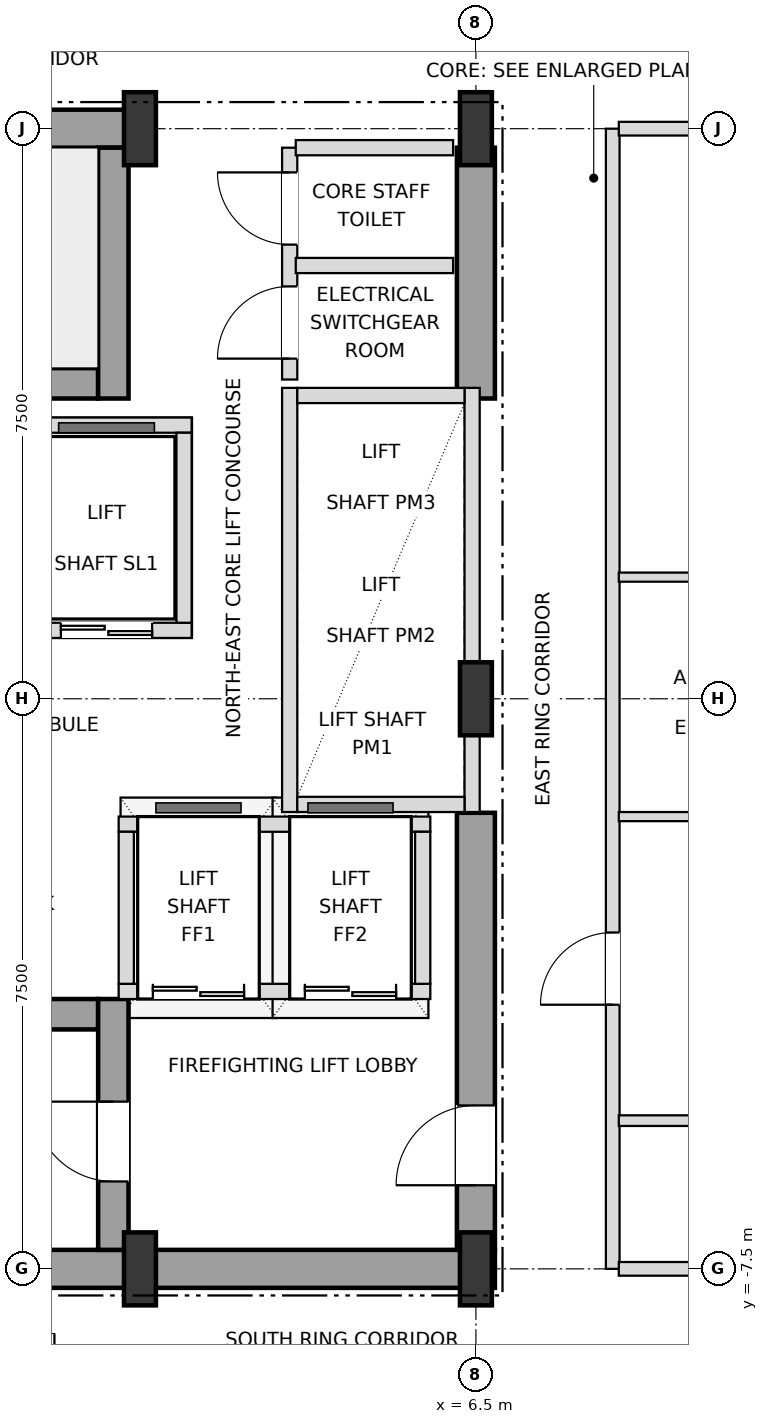
"""IFC4 building model, lengths in metres.
Left out: names, types, materials, properties, quantities, classifications, styles, units other than length and angle.
Written with IfcOpenShell. Run it as: python <this file> out.ifc"""

import sys

from ifc_helpers import new_model, si_unit, direction, frame, frame_2d, origin, origin_2d, place, context, subcontext, project, spatial, rectangle, i_section, extrude, element, fill, save


model = new_model("IFC4")
c1 = context("Model", 3, precision=1e-05, world=origin(), true_north=direction((0.0, 1.0)))
c2 = subcontext(c1, "Body", "Model", "MODEL_VIEW")
j1 = project(units=[si_unit("LENGTHUNIT", "METRE"), si_unit("PLANEANGLEUNIT", "RADIAN")], contexts=[c1])
p1 = place(None, origin())
s1 = spatial("IfcSite", under=j1, at=p1, CompositionType="ELEMENT")
p2 = place(p1, origin())
s2 = spatial("IfcBuilding", under=s1, at=p2, CompositionType="ELEMENT")
p3 = place(p2, frame((0.0, 0.0, 43.2)))
s3 = spatial("IfcBuildingStorey", under=s2, at=p3, CompositionType="ELEMENT", Elevation=43.2)
for number, where, z_axis, x_axis in (
    (1, (2.08, -7.5, 0.0), (0.0, 0.0, 1.0), (1.0, 0.0, 0.0)),
    (2, (6.5, -7.5, 0.0), (0.0, 0.0, 1.0), (1.0, 0.0, 0.0)),
    (3, (6.5, 0.0, 0.0), (0.0, 0.0, 1.0), (1.0, 0.0, 0.0)),
    (4, (2.08, 7.5, 0.0), (0.0, 0.0, 1.0), (1.0, 0.0, 0.0)),
    (5, (6.5, 7.5, 0.0), (0.0, 0.0, 1.0), (1.0, 0.0, 0.0)),
):
    element("IfcColumn", number, at=place(p3, frame(where, z_axis=z_axis, x_axis=x_axis)), inside=s3, PredefinedType="COLUMN", context=c2, shape_type="SweptSolid", body=[
        extrude(i_section(OverallWidth=0.42, OverallDepth=0.96, WebThickness=0.022, FlangeThickness=0.034, at=origin_2d()), origin(), (0.0, 0.0, 1.0), 3.6),
    ])
p4 = place(p3, frame((0.0, -7.5, 0.0), z_axis=(0.0, 0.0, 1.0), x_axis=(1.0, 0.0, 0.0)))
e6 = element("IfcWall", 6, at=p4, inside=s3, PredefinedType="SHEAR", context=c2, shape_type="SweptSolid", body=[
    extrude(rectangle(XDim=6.75, YDim=0.5, at=frame_2d((3.375, 0.0))), origin(), (0.0, 0.0, 1.0), 3.38),
])
p5 = place(p3, frame((0.0, 7.5, 0.0), z_axis=(0.0, 0.0, 1.0), x_axis=(1.0, 0.0, 0.0)))
e7 = element("IfcWall", 7, at=p5, inside=s3, PredefinedType="SHEAR", context=c2, shape_type="SweptSolid", body=[
    extrude(rectangle(XDim=2.08, YDim=0.5, at=frame_2d((1.04, 0.0))), origin(), (0.0, 0.0, 1.0), 3.38),
])
p6 = place(p3, frame((6.5, -7.25, 0.0), z_axis=(0.0, 0.0, 1.0), x_axis=(0.0, 1.0, 0.0)))
e8 = element("IfcWall", 8, at=p6, inside=s3, PredefinedType="SHEAR", context=c2, shape_type="SweptSolid", body=[
    extrude(rectangle(XDim=5.75, YDim=0.5, at=frame_2d((2.875, 0.0))), origin(), (0.0, 0.0, 1.0), 3.38),
])
p7 = place(p6, frame((0.85, 0.0, 0.0)))
e9 = element("IfcOpeningElement", 9, at=p7, cuts=e8, PredefinedType="OPENING", context=c2, shape_type="SweptSolid", body=[
    extrude(rectangle(XDim=1.05, YDim=2.15, at=frame_2d((0.525, 1.075))), frame((0.0, 0.26, 0.0), z_axis=(0.0, -1.0, 0.0), x_axis=(1.0, 0.0, 0.0)), (0.0, 0.0, 1.0), 0.52),
])
p8 = place(p3, frame((6.5, 3.95, 0.0), z_axis=(0.0, 0.0, 1.0), x_axis=(0.0, 1.0, 0.0)))
e10 = element("IfcWall", 10, at=p8, inside=s3, PredefinedType="SHEAR", context=c2, shape_type="SweptSolid", body=[
    extrude(rectangle(XDim=3.3, YDim=0.5, at=frame_2d((1.65, 0.0))), origin(), (0.0, 0.0, 1.0), 3.38),
])
p9 = place(p3, frame((-6.25, -4.15, 0.0), z_axis=(0.0, 0.0, 1.0), x_axis=(1.0, 0.0, 0.0)))
e11 = element("IfcWall", 11, at=p9, inside=s3, PredefinedType="SHEAR", context=c2, shape_type="SweptSolid", body=[
    extrude(rectangle(XDim=7.78, YDim=0.4, at=frame_2d((3.89, 0.0))), origin(), (0.0, 0.0, 1.0), 3.38),
])
p10 = place(p3, frame((1.73, -7.25, 0.0), z_axis=(0.0, 0.0, 1.0), x_axis=(0.0, 1.0, 0.0)))
e12 = element("IfcWall", 12, at=p10, inside=s3, PredefinedType="SHEAR", context=c2, shape_type="SweptSolid", body=[
    extrude(rectangle(XDim=3.3, YDim=0.4, at=frame_2d((1.65, 0.0))), origin(), (0.0, 0.0, 1.0), 3.38),
])
p11 = place(p10, frame((0.9, 0.0, 0.0)))
e13 = element("IfcOpeningElement", 13, at=p11, cuts=e12, PredefinedType="OPENING", context=c2, shape_type="SweptSolid", body=[
    extrude(rectangle(XDim=1.05, YDim=2.15, at=frame_2d((0.525, 1.075))), frame((0.0, 0.21, 0.0), z_axis=(0.0, -1.0, 0.0), x_axis=(1.0, 0.0, 0.0)), (0.0, 0.0, 1.0), 0.42),
])
p12 = place(p3, frame((-5.55, 4.15, 0.0), z_axis=(0.0, 0.0, 1.0), x_axis=(1.0, 0.0, 0.0)))
e14 = element("IfcWall", 14, at=p12, inside=s3, PredefinedType="SHEAR", context=c2, shape_type="SweptSolid", body=[
    extrude(rectangle(XDim=7.08, YDim=0.4, at=frame_2d((3.54, 0.0))), origin(), (0.0, 0.0, 1.0), 3.38),
])
p13 = place(p3, frame((1.73, 3.95, 0.0), z_axis=(0.0, 0.0, 1.0), x_axis=(0.0, 1.0, 0.0)))
e15 = element("IfcWall", 15, at=p13, inside=s3, PredefinedType="SHEAR", context=c2, shape_type="SweptSolid", body=[
    extrude(rectangle(XDim=3.3, YDim=0.4, at=frame_2d((1.65, 0.0))), origin(), (0.0, 0.0, 1.0), 3.38),
])
p14 = place(p3, frame((4.05, -1.49, 0.0), z_axis=(0.0, 0.0, 1.0), x_axis=(0.0, 1.0, 0.0)))
e16 = element("IfcWall", 16, at=p14, inside=s3, PredefinedType="SOLIDWALL", context=c2, shape_type="SweptSolid", body=[
    extrude(rectangle(XDim=5.58, YDim=0.2, at=frame_2d((2.79, 0.0))), origin(), (0.0, 0.0, 1.0), 3.38),
])
p15 = place(p3, frame((6.45, -1.49, 0.0), z_axis=(0.0, 0.0, 1.0), x_axis=(0.0, 1.0, 0.0)))
e17 = element("IfcWall", 17, at=p15, inside=s3, PredefinedType="SOLIDWALL", context=c2, shape_type="SweptSolid", body=[
    extrude(rectangle(XDim=5.58, YDim=0.2, at=frame_2d((2.79, 0.0))), origin(), (0.0, 0.0, 1.0), 2.816),
])
for number, where, z_axis, x_axis in (
    (18, (4.15, -1.39, 0.0), (0.0, 0.0, 1.0), (1.0, 0.0, 0.0)),
    (19, (4.15, 3.99, 0.0), (0.0, 0.0, 1.0), (1.0, 0.0, 0.0)),
):
    element("IfcWall", number, at=place(p3, frame(where, z_axis=z_axis, x_axis=x_axis)), inside=s3, PredefinedType="SOLIDWALL", context=c2, shape_type="SweptSolid", body=[
        extrude(rectangle(XDim=2.2, YDim=0.2, at=frame_2d((1.1, 0.0))), origin(), (0.0, 0.0, 1.0), 3.38),
    ])
p16 = place(p3, frame((-2.82, 0.9, 0.0), z_axis=(0.0, 0.0, 1.0), x_axis=(1.0, 0.0, 0.0)))
e20 = element("IfcWall", 20, at=p16, inside=s3, PredefinedType="SOLIDWALL", context=c2, shape_type="SweptSolid", body=[
    extrude(rectangle(XDim=5.58, YDim=0.2, at=frame_2d((2.79, 0.0))), origin(), (0.0, 0.0, 1.0), 3.38),
])
p17 = place(p16, frame((3.86, 0.0, 0.0)))
e21 = element("IfcOpeningElement", 21, at=p17, cuts=e20, PredefinedType="OPENING", context=c2, shape_type="SweptSolid", body=[
    extrude(rectangle(XDim=1.2, YDim=2.2, at=frame_2d((0.6, 1.1))), frame((0.0, 0.11, 0.0), z_axis=(0.0, -1.0, 0.0), x_axis=(1.0, 0.0, 0.0)), (0.0, 0.0, 1.0), 0.22),
])
p18 = place(p3, frame((-2.82, 3.6, 0.0), z_axis=(0.0, 0.0, 1.0), x_axis=(1.0, 0.0, 0.0)))
e22 = element("IfcWall", 22, at=p18, inside=s3, PredefinedType="SOLIDWALL", context=c2, shape_type="SweptSolid", body=[
    extrude(rectangle(XDim=5.58, YDim=0.2, at=frame_2d((2.79, 0.0))), origin(), (0.0, 0.0, 1.0), 3.38),
])
p19 = place(p3, frame((2.66, 1.0, 0.0), z_axis=(0.0, 0.0, 1.0), x_axis=(0.0, 1.0, 0.0)))
e23 = element("IfcWall", 23, at=p19, inside=s3, PredefinedType="SOLIDWALL", context=c2, shape_type="SweptSolid", body=[
    extrude(rectangle(XDim=2.5, YDim=0.2, at=frame_2d((1.25, 0.0))), origin(), (0.0, 0.0, 1.0), 3.38),
])
p20 = place(p3, frame((1.8, -3.85, 0.0), z_axis=(0.0, 0.0, 1.0), x_axis=(1.0, 0.0, 0.0)))
e24 = element("IfcWall", 24, at=p20, inside=s3, PredefinedType="SOLIDWALL", context=c2, shape_type="SweptSolid", body=[
    extrude(rectangle(XDim=4.1, YDim=0.2, at=frame_2d((2.05, 0.0))), origin(), (0.0, 0.0, 1.0), 3.38),
])
p21 = place(p20, frame((0.45, 0.0, 0.0)))
e25 = element("IfcOpeningElement", 25, at=p21, cuts=e24, PredefinedType="OPENING", context=c2, shape_type="SweptSolid", body=[
    extrude(rectangle(XDim=1.2, YDim=2.2, at=frame_2d((0.6, 1.1))), frame((0.0, 0.11, 0.0), z_axis=(0.0, -1.0, 0.0), x_axis=(1.0, 0.0, 0.0)), (0.0, 0.0, 1.0), 0.22),
])
p22 = place(p20, frame((2.45, 0.0, 0.0)))
e26 = element("IfcOpeningElement", 26, at=p22, cuts=e24, PredefinedType="OPENING", context=c2, shape_type="SweptSolid", body=[
    extrude(rectangle(XDim=1.2, YDim=2.2, at=frame_2d((0.6, 1.1))), frame((0.0, 0.11, 0.0), z_axis=(0.0, -1.0, 0.0), x_axis=(1.0, 0.0, 0.0)), (0.0, 0.0, 1.0), 0.22),
])
p23 = place(p3, frame((1.8, -1.65, 0.0), z_axis=(0.0, 0.0, 1.0), x_axis=(1.0, 0.0, 0.0)))
e27 = element("IfcWall", 27, at=p23, inside=s3, PredefinedType="SOLIDWALL", context=c2, shape_type="SweptSolid", body=[
    extrude(rectangle(XDim=4.1, YDim=0.2, at=frame_2d((2.05, 0.0))), origin(), (0.0, 0.0, 1.0), 3.38),
])
for number, where, z_axis, x_axis in (
    (28, (1.9, -3.75, 0.0), (0.0, 0.0, 1.0), (0.0, 1.0, 0.0)),
    (29, (5.8, -3.75, 0.0), (0.0, 0.0, 1.0), (0.0, 1.0, 0.0)),
):
    element("IfcWall", number, at=place(p3, frame(where, z_axis=z_axis, x_axis=x_axis)), inside=s3, PredefinedType="SOLIDWALL", context=c2, shape_type="SweptSolid", body=[
        extrude(rectangle(XDim=2.0, YDim=0.2, at=frame_2d((1.0, 0.0))), origin(), (0.0, 0.0, 1.0), 3.38),
    ])
p24 = place(p3, frame((4.05, 4.2, 0.0), z_axis=(0.0, 0.0, 1.0), x_axis=(0.0, 1.0, 0.0)))
e30 = element("IfcWall", 30, at=p24, inside=s3, PredefinedType="SOLIDWALL", context=c2, shape_type="SweptSolid", body=[
    extrude(rectangle(XDim=3.05, YDim=0.2, at=frame_2d((1.525, 0.0))), origin(), (0.0, 0.0, 1.0), 3.38),
])
p25 = place(p24, frame((0.275, 0.0, 0.0)))
e31 = element("IfcOpeningElement", 31, at=p25, cuts=e30, PredefinedType="OPENING", context=c2, shape_type="SweptSolid", body=[
    extrude(rectangle(XDim=0.95, YDim=2.15, at=frame_2d((0.475, 1.075))), frame((0.0, 0.11, 0.0), z_axis=(0.0, -1.0, 0.0), x_axis=(1.0, 0.0, 0.0)), (0.0, 0.0, 1.0), 0.22),
])
p26 = place(p24, frame((1.775, 0.0, 0.0)))
e32 = element("IfcOpeningElement", 32, at=p26, cuts=e30, PredefinedType="OPENING", context=c2, shape_type="SweptSolid", body=[
    extrude(rectangle(XDim=0.95, YDim=2.15, at=frame_2d((0.475, 1.075))), frame((0.0, 0.11, 0.0), z_axis=(0.0, -1.0, 0.0), x_axis=(1.0, 0.0, 0.0)), (0.0, 0.0, 1.0), 0.22),
])
p27 = place(p3, frame((8.3, -7.5, 0.0), z_axis=(0.0, 0.0, 1.0), x_axis=(0.0, 1.0, 0.0)))
e33 = element("IfcWall", 33, at=p27, inside=s3, PredefinedType="PARTITIONING", context=c2, shape_type="SweptSolid", body=[
    extrude(rectangle(XDim=15.0, YDim=0.18, at=frame_2d((7.5, 0.0))), origin(), (0.0, 0.0, 1.0), 3.38),
])
p28 = place(p27, frame((3.475, 0.0, 0.0)))
e34 = element("IfcOpeningElement", 34, at=p28, cuts=e33, PredefinedType="OPENING", context=c2, shape_type="SweptSolid", body=[
    extrude(rectangle(XDim=0.95, YDim=2.15, at=frame_2d((0.475, 1.075))), frame((0.0, 0.1, 0.0), z_axis=(0.0, -1.0, 0.0), x_axis=(1.0, 0.0, 0.0)), (0.0, 0.0, 1.0), 0.2),
])
p29 = place(p3, frame((8.38, -7.5, 0.0), z_axis=(0.0, 0.0, 1.0), x_axis=(1.0, 0.0, 0.0)))
e35 = element("IfcWall", 35, at=p29, inside=s3, PredefinedType="PARTITIONING", context=c2, shape_type="SweptSolid", body=[
    extrude(rectangle(XDim=7.64, YDim=0.18, at=frame_2d((3.82, 0.0))), origin(), (0.0, 0.0, 1.0), 2.816),
])
p30 = place(p3, frame((8.38, -5.55, 0.0), z_axis=(0.0, 0.0, 1.0), x_axis=(1.0, 0.0, 0.0)))
e36 = element("IfcWall", 36, at=p30, inside=s3, PredefinedType="PARTITIONING", context=c2, shape_type="SweptSolid", body=[
    extrude(rectangle(XDim=7.64, YDim=0.14, at=frame_2d((3.82, 0.0))), origin(), (0.0, 0.0, 1.0), 2.948),
])
p31 = place(p30, frame((3.37, 0.0, 0.0)))
e37 = element("IfcOpeningElement", 37, at=p31, cuts=e36, PredefinedType="OPENING", context=c2, shape_type="SweptSolid", body=[
    extrude(rectangle(XDim=0.9, YDim=2.1, at=frame_2d((0.45, 1.05))), frame((0.0, 0.08, 0.0), z_axis=(0.0, -1.0, 0.0), x_axis=(1.0, 0.0, 0.0)), (0.0, 0.0, 1.0), 0.16),
])
p32 = place(p3, frame((8.38, -1.55, 0.0), z_axis=(0.0, 0.0, 1.0), x_axis=(1.0, 0.0, 0.0)))
e38 = element("IfcWall", 38, at=p32, inside=s3, PredefinedType="PARTITIONING", context=c2, shape_type="SweptSolid", body=[
    extrude(rectangle(XDim=7.64, YDim=0.12, at=frame_2d((3.82, 0.0))), origin(), (0.0, 0.0, 1.0), 2.948),
])
p33 = place(p32, frame((3.345, 0.0, 0.0)))
e39 = element("IfcOpeningElement", 39, at=p33, cuts=e38, PredefinedType="OPENING", context=c2, shape_type="SweptSolid", body=[
    extrude(rectangle(XDim=0.95, YDim=2.1, at=frame_2d((0.475, 1.05))), frame((0.0, 0.07, 0.0), z_axis=(0.0, -1.0, 0.0), x_axis=(1.0, 0.0, 0.0)), (0.0, 0.0, 1.0), 0.14),
])
p34 = place(p3, frame((8.38, 1.6, 0.0), z_axis=(0.0, 0.0, 1.0), x_axis=(1.0, 0.0, 0.0)))
e40 = element("IfcWall", 40, at=p34, inside=s3, PredefinedType="PARTITIONING", context=c2, shape_type="SweptSolid", body=[
    extrude(rectangle(XDim=7.64, YDim=0.12, at=frame_2d((3.82, 0.0))), origin(), (0.0, 0.0, 1.0), 2.948),
])
p35 = place(p34, frame((3.37, 0.0, 0.0)))
e41 = element("IfcOpeningElement", 41, at=p35, cuts=e40, PredefinedType="OPENING", context=c2, shape_type="SweptSolid", body=[
    extrude(rectangle(XDim=0.9, YDim=2.1, at=frame_2d((0.45, 1.05))), frame((0.0, 0.07, 0.0), z_axis=(0.0, -1.0, 0.0), x_axis=(1.0, 0.0, 0.0)), (0.0, 0.0, 1.0), 0.14),
])
for number, where, z_axis, x_axis in (
    (42, (4.13, 5.7, 0.0), (0.0, 0.0, 1.0), (1.0, 0.0, 0.0)),
    (43, (4.13, 7.25, 0.0), (0.0, 0.0, 1.0), (1.0, 0.0, 0.0)),
):
    element("IfcWall", number, at=place(p3, frame(where, z_axis=z_axis, x_axis=x_axis)), inside=s3, PredefinedType="SOLIDWALL", context=c2, shape_type="SweptSolid", body=[
        extrude(rectangle(XDim=2.07, YDim=0.2, at=frame_2d((1.035, 0.0))), origin(), (0.0, 0.0, 1.0), 3.38),
    ])
p36 = place(p3, frame((8.38, 7.5, 0.0), z_axis=(0.0, 0.0, 1.0), x_axis=(1.0, 0.0, 0.0)))
e44 = element("IfcWall", 44, at=p36, inside=s3, PredefinedType="PARTITIONING", context=c2, shape_type="SweptSolid", body=[
    extrude(rectangle(XDim=7.64, YDim=0.18, at=frame_2d((3.82, 0.0))), origin(), (0.0, 0.0, 1.0), 2.816),
])
p37 = place(p7, origin())
e45 = element("IfcDoor", 45, at=p37, inside=s3, OperationType="SINGLE_SWING_LEFT", PredefinedType="DOOR", context=c2, shape_type="SweptSolid", body=[
    extrude(rectangle(XDim=1.05, YDim=2.15, at=frame_2d((0.525, 1.075))), frame((0.0, 0.025, 0.0), z_axis=(0.0, -1.0, 0.0), x_axis=(1.0, 0.0, 0.0)), (0.0, 0.0, 1.0), 0.05),
])
fill(e9, e45)
p38 = place(p11, origin())
e46 = element("IfcDoor", 46, at=p38, inside=s3, OperationType="SINGLE_SWING_RIGHT", PredefinedType="DOOR", context=c2, shape_type="SweptSolid", body=[
    extrude(rectangle(XDim=1.05, YDim=2.15, at=frame_2d((0.525, 1.075))), frame((0.0, 0.025, 0.0), z_axis=(0.0, -1.0, 0.0), x_axis=(1.0, 0.0, 0.0)), (0.0, 0.0, 1.0), 0.05),
])
fill(e13, e46)
p39 = place(p17, origin())
e47 = element("IfcDoor", 47, at=p39, inside=s3, OperationType="DOUBLE_DOOR_SLIDING", PredefinedType="DOOR", context=c2, shape_type="SweptSolid", body=[
    extrude(rectangle(XDim=1.2, YDim=2.2, at=frame_2d((0.6, 1.1))), frame((0.0, 0.025, 0.0), z_axis=(0.0, -1.0, 0.0), x_axis=(1.0, 0.0, 0.0)), (0.0, 0.0, 1.0), 0.05),
])
fill(e21, e47)
p40 = place(p21, origin())
e48 = element("IfcDoor", 48, at=p40, inside=s3, OperationType="DOUBLE_DOOR_SLIDING", PredefinedType="DOOR", context=c2, shape_type="SweptSolid", body=[
    extrude(rectangle(XDim=1.2, YDim=2.2, at=frame_2d((0.6, 1.1))), frame((0.0, 0.025, 0.0), z_axis=(0.0, -1.0, 0.0), x_axis=(1.0, 0.0, 0.0)), (0.0, 0.0, 1.0), 0.05),
])
fill(e25, e48)
p41 = place(p22, origin())
e49 = element("IfcDoor", 49, at=p41, inside=s3, OperationType="DOUBLE_DOOR_SLIDING", PredefinedType="DOOR", context=c2, shape_type="SweptSolid", body=[
    extrude(rectangle(XDim=1.2, YDim=2.2, at=frame_2d((0.6, 1.1))), frame((0.0, 0.025, 0.0), z_axis=(0.0, -1.0, 0.0), x_axis=(1.0, 0.0, 0.0)), (0.0, 0.0, 1.0), 0.05),
])
fill(e26, e49)
p42 = place(p25, origin())
e50 = element("IfcDoor", 50, at=p42, inside=s3, OperationType="SINGLE_SWING_LEFT", PredefinedType="DOOR", context=c2, shape_type="SweptSolid", body=[
    extrude(rectangle(XDim=0.95, YDim=2.15, at=frame_2d((0.475, 1.075))), frame((0.0, 0.025, 0.0), z_axis=(0.0, -1.0, 0.0), x_axis=(1.0, 0.0, 0.0)), (0.0, 0.0, 1.0), 0.05),
])
fill(e31, e50)
p43 = place(p26, origin())
e51 = element("IfcDoor", 51, at=p43, inside=s3, OperationType="SINGLE_SWING_RIGHT", PredefinedType="DOOR", context=c2, shape_type="SweptSolid", body=[
    extrude(rectangle(XDim=0.95, YDim=2.15, at=frame_2d((0.475, 1.075))), frame((0.0, 0.025, 0.0), z_axis=(0.0, -1.0, 0.0), x_axis=(1.0, 0.0, 0.0)), (0.0, 0.0, 1.0), 0.05),
])
fill(e32, e51)
p44 = place(p28, origin())
e52 = element("IfcDoor", 52, at=p44, inside=s3, OperationType="SINGLE_SWING_LEFT", PredefinedType="DOOR", context=c2, shape_type="SweptSolid", body=[
    extrude(rectangle(XDim=0.95, YDim=2.15, at=frame_2d((0.475, 1.075))), frame((0.0, 0.025, 0.0), z_axis=(0.0, -1.0, 0.0), x_axis=(1.0, 0.0, 0.0)), (0.0, 0.0, 1.0), 0.05),
])
fill(e34, e52)
save(model, sys.argv[1])
